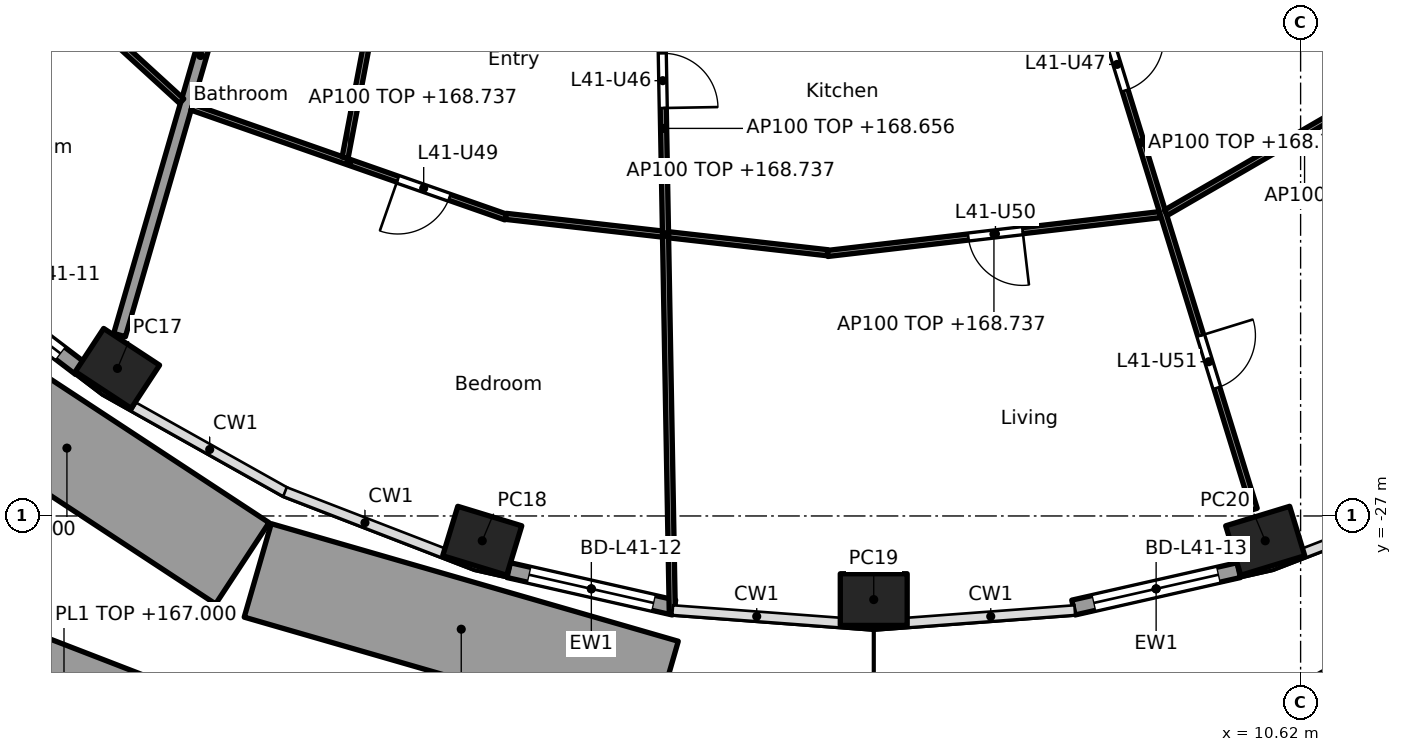
"""IFC4 building model, lengths in metres.
Left out: names, types, materials, properties, quantities, classifications, styles, units other than length and angle.
Written with IfcOpenShell. Run it as: python <this file> out.ifc"""

import sys

from ifc_helpers import new_model, si_unit, direction, frame, frame_2d, origin, origin_2d, place, context, subcontext, project, spatial, rectangle, hollow_rectangle, extrude, element, fill, save


model = new_model("IFC4")
c1 = context("Model", 3, precision=1e-05, world=origin(), true_north=direction((0.0, 1.0)))
c2 = subcontext(c1, "Body", "Model", "MODEL_VIEW")
j1 = project(units=[si_unit("LENGTHUNIT", "METRE"), si_unit("PLANEANGLEUNIT", "RADIAN")], contexts=[c1])
p1 = place(None, origin())
s1 = spatial("IfcSite", under=j1, at=p1, CompositionType="ELEMENT")
p2 = place(p1, origin())
s2 = spatial("IfcBuilding", under=s1, at=p2, CompositionType="ELEMENT")
p3 = place(p2, frame((0.0, 0.0, 165.9)))
s3 = spatial("IfcBuildingStorey", under=s2, at=p3, CompositionType="ELEMENT", Elevation=165.9)
for number, where, z_axis, x_axis in (
    (1, (-8.837, -24.573, -0.26), (0.0, 0.0, 1.0), (0.836, -0.549, 0.0)),
    (2, (-2.838, -27.408, -0.26), (0.0, 0.0, 1.0), (0.957, -0.292, 0.0)),
    (3, (3.6, -28.375, -0.26), (0.0, 0.0, 1.0), (1.0, 0.0, 0.0)),
    (4, (10.038, -27.408, -0.26), (0.0, 0.0, 1.0), (0.957, 0.292, 0.0)),
):
    element("IfcColumn", number, at=place(p3, frame(where, z_axis=z_axis, x_axis=x_axis)), inside=s3, PredefinedType="COLUMN", context=c2, shape_type="SweptSolid", body=[
        extrude(hollow_rectangle(XDim=1.1, YDim=0.85, WallThickness=0.036, at=origin_2d()), origin(), (0.0, 0.0, 1.0), 3.96),
    ])
p4 = place(p3, frame((-9.45, -24.574, 0.0), z_axis=(0.0, 0.0, 1.0), x_axis=(-0.796055733703, 0.60522332146, 0.0)))
e5 = element("IfcWall", 5, at=p4, inside=s3, PredefinedType="SOLIDWALL", context=c2, shape_type="SweptSolid", body=[
    extrude(rectangle(XDim=2.917, YDim=0.25, at=frame_2d((1.458, 0.0))), origin(), (0.0, 0.0, 1.0), 3.44),
])
p5 = place(p4, frame((0.408, 0.0, 0.0)))
e6 = element("IfcOpeningElement", 6, at=p5, cuts=e5, PredefinedType="OPENING", context=c2, shape_type="SweptSolid", body=[
    extrude(rectangle(XDim=2.1, YDim=2.4, at=frame_2d((1.05, 1.2))), frame((0.0, 0.135, 0.0), z_axis=(0.0, -1.0, 0.0), x_axis=(1.0, 0.0, 0.0)), (0.0, 0.0, 1.0), 0.27),
])
p6 = place(p3, frame((0.315, -28.506, 0.0), z_axis=(0.0, 0.0, 1.0), x_axis=(-0.975324329911, 0.220776926974, 0.0)))
e7 = element("IfcWall", 7, at=p6, inside=s3, PredefinedType="SOLIDWALL", context=c2, shape_type="SweptSolid", body=[
    extrude(rectangle(XDim=2.788, YDim=0.25, at=frame_2d((1.394, 0.0))), origin(), (0.0, 0.0, 1.0), 3.44),
])
p7 = place(p6, frame((0.344, 0.0, 0.0)))
e8 = element("IfcOpeningElement", 8, at=p7, cuts=e7, PredefinedType="OPENING", context=c2, shape_type="SweptSolid", body=[
    extrude(rectangle(XDim=2.1, YDim=2.4, at=frame_2d((1.05, 1.2))), frame((0.0, 0.135, 0.0), z_axis=(0.0, -1.0, 0.0), x_axis=(1.0, 0.0, 0.0)), (0.0, 0.0, 1.0), 0.27),
])
p8 = place(p3, frame((9.604, -27.891, 0.0), z_axis=(0.0, 0.0, 1.0), x_axis=(-0.975324329911, -0.220776926974, 0.0)))
e9 = element("IfcWall", 9, at=p8, inside=s3, PredefinedType="SOLIDWALL", context=c2, shape_type="SweptSolid", body=[
    extrude(rectangle(XDim=2.788, YDim=0.25, at=frame_2d((1.394, 0.0))), origin(), (0.0, 0.0, 1.0), 3.44),
])
p9 = place(p8, frame((0.344, 0.0, 0.0)))
e10 = element("IfcOpeningElement", 10, at=p9, cuts=e9, PredefinedType="OPENING", context=c2, shape_type="SweptSolid", body=[
    extrude(rectangle(XDim=2.1, YDim=2.4, at=frame_2d((1.05, 1.2))), frame((0.0, 0.135, 0.0), z_axis=(0.0, -1.0, 0.0), x_axis=(1.0, 0.0, 0.0)), (0.0, 0.0, 1.0), 0.27),
])
p10 = place(p3, frame((-12.553, -23.989, 0.0), z_axis=(0.0, 0.0, 1.0), x_axis=(0.835812595664, -0.549014849462, 0.0)))
e11 = element("IfcWall", 11, at=p10, inside=s3, PredefinedType="SOLIDWALL", context=c2, shape_type="SweptSolid", body=[
    extrude(rectangle(XDim=6.903, YDim=1.6, at=frame_2d((3.451, 0.0))), origin(), (0.0, 0.0, 1.0), 1.1),
])
p11 = place(p3, frame((-6.531, -27.895, 0.0), z_axis=(0.0, 0.0, 1.0), x_axis=(0.96072394004, -0.277505875674, 0.0)))
e12 = element("IfcWall", 12, at=p11, inside=s3, PredefinedType="SOLIDWALL", context=c2, shape_type="SweptSolid", body=[
    extrude(rectangle(XDim=6.968, YDim=1.6, at=frame_2d((3.484, 0.0))), origin(), (0.0, 0.0, 1.0), 1.1),
])
p12 = place(p3, frame((-5.256, -31.693, 0.0), z_axis=(0.0, 0.0, 1.0), x_axis=(-0.932763411203, 0.360489138146, 0.0)))
e13 = element("IfcWall", 13, at=p12, inside=s3, PredefinedType="SOLIDWALL", context=c2, shape_type="SweptSolid", body=[
    extrude(rectangle(XDim=9.563, YDim=1.6, at=frame_2d((4.782, 0.0))), origin(), (0.0, 0.0, 1.0), 1.1),
])
p13 = place(p3, frame((-6.137, -14.83, 0.0), z_axis=(0.0, 0.0, 1.0), x_axis=(-0.278461169897, -0.96044748782, 0.0)))
e14 = element("IfcWall", 14, at=p13, inside=s3, PredefinedType="PARTITIONING", context=c2, shape_type="SweptSolid", body=[
    extrude(rectangle(XDim=9.573, YDim=0.2, at=frame_2d((4.787, 0.0))), origin(), (0.0, 0.0, 1.0), 2.837),
])
p14 = place(p3, frame((-11.766, -16.535, 0.0), z_axis=(0.0, 0.0, 1.0), x_axis=(0.73807320557, -0.674720640872, 0.0)))
e15 = element("IfcWall", 15, at=p14, inside=s3, PredefinedType="PARTITIONING", context=c2, shape_type="SweptSolid", body=[
    extrude(rectangle(XDim=5.399, YDim=0.1, at=frame_2d((2.699, 0.0))), origin(), (0.0, 0.0, 1.0), 2.837),
])
p15 = place(p3, frame((-7.613, -20.278, 0.0), z_axis=(0.0, 0.0, 1.0), x_axis=(0.943918212431, -0.330179357684, 0.0)))
e16 = element("IfcWall", 16, at=p15, inside=s3, PredefinedType="PARTITIONING", context=c2, shape_type="SweptSolid", body=[
    extrude(rectangle(XDim=5.467, YDim=0.1, at=frame_2d((2.734, 0.0))), origin(), (0.0, 0.0, 1.0), 2.837),
])
p16 = place(p15, frame((3.588, 0.0, 0.0)))
e17 = element("IfcOpeningElement", 17, at=p16, cuts=e16, PredefinedType="OPENING", context=c2, shape_type="SweptSolid", body=[
    extrude(rectangle(XDim=0.9, YDim=2.1, at=frame_2d((0.45, 1.05))), frame((0.0, 0.06, 0.0), z_axis=(0.0, -1.0, 0.0), x_axis=(1.0, 0.0, 0.0)), (0.0, 0.0, 1.0), 0.12),
])
p17 = place(p3, frame((-3.488, -12.663, 0.0), z_axis=(0.0, 0.0, 1.0), x_axis=(-0.186783185485, -0.982401161247, 0.0)))
e18 = element("IfcWall", 18, at=p17, inside=s3, PredefinedType="PARTITIONING", context=c2, shape_type="SweptSolid", body=[
    extrude(rectangle(XDim=8.595, YDim=0.1, at=frame_2d((4.298, 0.0))), origin(), (0.0, 0.0, 1.0), 2.756),
])
p18 = place(p17, frame((0.35, 0.0, 0.0)))
e19 = element("IfcOpeningElement", 19, at=p18, cuts=e18, PredefinedType="OPENING", context=c2, shape_type="SweptSolid", body=[
    extrude(rectangle(XDim=0.9, YDim=2.1, at=frame_2d((0.45, 1.05))), frame((0.0, 0.06, 0.0), z_axis=(0.0, -1.0, 0.0), x_axis=(1.0, 0.0, 0.0)), (0.0, 0.0, 1.0), 0.12),
])
p19 = place(p17, frame((5.908, 0.0, 0.0)))
e20 = element("IfcOpeningElement", 20, at=p19, cuts=e18, PredefinedType="OPENING", context=c2, shape_type="SweptSolid", body=[
    extrude(rectangle(XDim=0.9, YDim=2.1, at=frame_2d((0.45, 1.05))), frame((0.0, 0.06, 0.0), z_axis=(0.0, -1.0, 0.0), x_axis=(1.0, 0.0, 0.0)), (0.0, 0.0, 1.0), 0.12),
])
p20 = place(p3, frame((-2.449, -22.073, 0.0), z_axis=(0.0, 0.0, 1.0), x_axis=(0.993660315081, -0.112424099879, 0.0)))
e21 = element("IfcWall", 21, at=p20, inside=s3, PredefinedType="PARTITIONING", context=c2, shape_type="SweptSolid", body=[
    extrude(rectangle(XDim=5.325, YDim=0.1, at=frame_2d((2.662, 0.0))), origin(), (0.0, 0.0, 1.0), 2.837),
])
p21 = place(p3, frame((0.002, -12.665, 0.0), z_axis=(0.0, 0.0, 1.0), x_axis=(0.01792079652, -0.999839409631, 0.0)))
e22 = element("IfcWall", 22, at=p21, inside=s3, PredefinedType="PARTITIONING", context=c2, shape_type="SweptSolid", body=[
    extrude(rectangle(XDim=15.926, YDim=0.1, at=frame_2d((7.963, 0.0))), origin(), (0.0, 0.0, 1.0), 2.756),
])
p22 = place(p21, frame((1.873, 0.0, 0.0)))
e23 = element("IfcOpeningElement", 23, at=p22, cuts=e22, PredefinedType="OPENING", context=c2, shape_type="SweptSolid", body=[
    extrude(rectangle(XDim=0.9, YDim=2.1, at=frame_2d((0.45, 1.05))), frame((0.0, 0.06, 0.0), z_axis=(0.0, -1.0, 0.0), x_axis=(1.0, 0.0, 0.0)), (0.0, 0.0, 1.0), 0.12),
])
p23 = place(p21, frame((6.728, 0.0, 0.0)))
e24 = element("IfcOpeningElement", 24, at=p23, cuts=e22, PredefinedType="OPENING", context=c2, shape_type="SweptSolid", body=[
    extrude(rectangle(XDim=0.9, YDim=2.1, at=frame_2d((0.45, 1.05))), frame((0.0, 0.06, 0.0), z_axis=(0.0, -1.0, 0.0), x_axis=(1.0, 0.0, 0.0)), (0.0, 0.0, 1.0), 0.12),
])
p24 = place(p3, frame((2.842, -22.683, 0.0), z_axis=(0.0, 0.0, 1.0), x_axis=(0.993248590259, 0.116005335864, 0.0)))
e25 = element("IfcWall", 25, at=p24, inside=s3, PredefinedType="PARTITIONING", context=c2, shape_type="SweptSolid", body=[
    extrude(rectangle(XDim=5.508, YDim=0.1, at=frame_2d((2.754, 0.0))), origin(), (0.0, 0.0, 1.0), 2.837),
])
p25 = place(p24, frame((2.329, 0.0, 0.0)))
e26 = element("IfcOpeningElement", 26, at=p25, cuts=e25, PredefinedType="OPENING", context=c2, shape_type="SweptSolid", body=[
    extrude(rectangle(XDim=0.9, YDim=2.1, at=frame_2d((0.45, 1.05))), frame((0.0, 0.06, 0.0), z_axis=(0.0, -1.0, 0.0), x_axis=(1.0, 0.0, 0.0)), (0.0, 0.0, 1.0), 0.12),
])
p26 = place(p3, frame((6.138, -14.83, 0.0), z_axis=(0.0, 0.0, 1.0), x_axis=(0.294818517221, -0.955553264818, 0.0)))
e27 = element("IfcWall", 27, at=p26, inside=s3, PredefinedType="PARTITIONING", context=c2, shape_type="SweptSolid", body=[
    extrude(rectangle(XDim=12.619, YDim=0.1, at=frame_2d((6.31, 0.0))), origin(), (0.0, 0.0, 1.0), 2.837),
])
p27 = place(p26, frame((1.306, 0.0, 0.0)))
e28 = element("IfcOpeningElement", 28, at=p27, cuts=e27, PredefinedType="OPENING", context=c2, shape_type="SweptSolid", body=[
    extrude(rectangle(XDim=0.9, YDim=2.1, at=frame_2d((0.45, 1.05))), frame((0.0, 0.06, 0.0), z_axis=(0.0, -1.0, 0.0), x_axis=(1.0, 0.0, 0.0)), (0.0, 0.0, 1.0), 0.12),
])
p28 = place(p26, frame((4.515, 0.0, 0.0)))
e29 = element("IfcOpeningElement", 29, at=p28, cuts=e27, PredefinedType="OPENING", context=c2, shape_type="SweptSolid", body=[
    extrude(rectangle(XDim=0.9, YDim=2.1, at=frame_2d((0.45, 1.05))), frame((0.0, 0.06, 0.0), z_axis=(0.0, -1.0, 0.0), x_axis=(1.0, 0.0, 0.0)), (0.0, 0.0, 1.0), 0.12),
])
p29 = place(p26, frame((9.632, 0.0, 0.0)))
e30 = element("IfcOpeningElement", 30, at=p29, cuts=e27, PredefinedType="OPENING", context=c2, shape_type="SweptSolid", body=[
    extrude(rectangle(XDim=0.9, YDim=2.1, at=frame_2d((0.45, 1.05))), frame((0.0, 0.06, 0.0), z_axis=(0.0, -1.0, 0.0), x_axis=(1.0, 0.0, 0.0)), (0.0, 0.0, 1.0), 0.12),
])
p30 = place(p3, frame((8.405, -22.013, 0.0), z_axis=(0.0, 0.0, 1.0), x_axis=(0.865277177388, 0.501293732547, 0.0)))
e31 = element("IfcWall", 31, at=p30, inside=s3, PredefinedType="PARTITIONING", context=c2, shape_type="SweptSolid", body=[
    extrude(rectangle(XDim=5.27, YDim=0.1, at=frame_2d((2.635, 0.0))), origin(), (0.0, 0.0, 1.0), 2.837),
])
p31 = place(p3, frame((8.943, -8.966, 0.0), z_axis=(0.0, 0.0, 1.0), x_axis=(0.586803608919, -0.809729290912, 0.0)))
e32 = element("IfcWall", 32, at=p31, inside=s3, PredefinedType="PARTITIONING", context=c2, shape_type="SweptSolid", body=[
    extrude(rectangle(XDim=17.179, YDim=0.1, at=frame_2d((8.589, 0.0))), origin(), (0.0, 0.0, 1.0), 2.756),
])
p32 = place(p31, frame((2.062, 0.0, 0.0)))
e33 = element("IfcOpeningElement", 33, at=p32, cuts=e32, PredefinedType="OPENING", context=c2, shape_type="SweptSolid", body=[
    extrude(rectangle(XDim=0.9, YDim=2.1, at=frame_2d((0.45, 1.05))), frame((0.0, 0.06, 0.0), z_axis=(0.0, -1.0, 0.0), x_axis=(1.0, 0.0, 0.0)), (0.0, 0.0, 1.0), 0.12),
])
p33 = place(p31, frame((7.308, 0.0, 0.0)))
e34 = element("IfcOpeningElement", 34, at=p33, cuts=e32, PredefinedType="OPENING", context=c2, shape_type="SweptSolid", body=[
    extrude(rectangle(XDim=0.9, YDim=2.1, at=frame_2d((0.45, 1.05))), frame((0.0, 0.06, 0.0), z_axis=(0.0, -1.0, 0.0), x_axis=(1.0, 0.0, 0.0)), (0.0, 0.0, 1.0), 0.12),
])
p34 = place(p5, origin())
e35 = element("IfcDoor", 35, at=p34, inside=s3, OperationType="SLIDING_TO_LEFT", PredefinedType="DOOR", context=c2, shape_type="SweptSolid", body=[
    extrude(rectangle(XDim=2.1, YDim=2.4, at=frame_2d((1.05, 1.2))), frame((0.0, 0.025, 0.0), z_axis=(0.0, -1.0, 0.0), x_axis=(1.0, 0.0, 0.0)), (0.0, 0.0, 1.0), 0.05),
])
fill(e6, e35)
p35 = place(p7, origin())
e36 = element("IfcDoor", 36, at=p35, inside=s3, OperationType="SLIDING_TO_LEFT", PredefinedType="DOOR", context=c2, shape_type="SweptSolid", body=[
    extrude(rectangle(XDim=2.1, YDim=2.4, at=frame_2d((1.05, 1.2))), frame((0.0, 0.025, 0.0), z_axis=(0.0, -1.0, 0.0), x_axis=(1.0, 0.0, 0.0)), (0.0, 0.0, 1.0), 0.05),
])
fill(e8, e36)
p36 = place(p9, origin())
e37 = element("IfcDoor", 37, at=p36, inside=s3, OperationType="SLIDING_TO_LEFT", PredefinedType="DOOR", context=c2, shape_type="SweptSolid", body=[
    extrude(rectangle(XDim=2.1, YDim=2.4, at=frame_2d((1.05, 1.2))), frame((0.0, 0.025, 0.0), z_axis=(0.0, -1.0, 0.0), x_axis=(1.0, 0.0, 0.0)), (0.0, 0.0, 1.0), 0.05),
])
fill(e10, e37)
p37 = place(p23, origin())
e38 = element("IfcDoor", 38, at=p37, inside=s3, OperationType="SINGLE_SWING_RIGHT", PredefinedType="DOOR", context=c2, shape_type="SweptSolid", body=[
    extrude(rectangle(XDim=0.9, YDim=2.1, at=frame_2d((0.45, 1.05))), frame((0.0, 0.025, 0.0), z_axis=(0.0, -1.0, 0.0), x_axis=(1.0, 0.0, 0.0)), (0.0, 0.0, 1.0), 0.05),
])
fill(e24, e38)
p38 = place(p28, origin())
e39 = element("IfcDoor", 39, at=p38, inside=s3, OperationType="SINGLE_SWING_LEFT", PredefinedType="DOOR", context=c2, shape_type="SweptSolid", body=[
    extrude(rectangle(XDim=0.9, YDim=2.1, at=frame_2d((0.45, 1.05))), frame((0.0, 0.025, 0.0), z_axis=(0.0, -1.0, 0.0), x_axis=(1.0, 0.0, 0.0)), (0.0, 0.0, 1.0), 0.05),
])
fill(e29, e39)
p39 = place(p16, frame((0.9, 0.0, 0.0), x_axis=(-1.0, 0.0, 0.0)))
e40 = element("IfcDoor", 40, at=p39, inside=s3, OperationType="SINGLE_SWING_RIGHT", PredefinedType="DOOR", context=c2, shape_type="SweptSolid", body=[
    extrude(rectangle(XDim=0.9, YDim=2.1, at=frame_2d((0.45, 1.05))), frame((0.0, 0.025, 0.0), z_axis=(0.0, -1.0, 0.0), x_axis=(1.0, 0.0, 0.0)), (0.0, 0.0, 1.0), 0.05),
])
fill(e17, e40)
p40 = place(p25, frame((0.9, 0.0, 0.0), x_axis=(-1.0, 0.0, 0.0)))
e41 = element("IfcDoor", 41, at=p40, inside=s3, OperationType="SINGLE_SWING_LEFT", PredefinedType="DOOR", context=c2, shape_type="SweptSolid", body=[
    extrude(rectangle(XDim=0.9, YDim=2.1, at=frame_2d((0.45, 1.05))), frame((0.0, 0.025, 0.0), z_axis=(0.0, -1.0, 0.0), x_axis=(1.0, 0.0, 0.0)), (0.0, 0.0, 1.0), 0.05),
])
fill(e26, e41)
p41 = place(p29, origin())
e42 = element("IfcDoor", 42, at=p41, inside=s3, OperationType="SINGLE_SWING_LEFT", PredefinedType="DOOR", context=c2, shape_type="SweptSolid", body=[
    extrude(rectangle(XDim=0.9, YDim=2.1, at=frame_2d((0.45, 1.05))), frame((0.0, 0.025, 0.0), z_axis=(0.0, -1.0, 0.0), x_axis=(1.0, 0.0, 0.0)), (0.0, 0.0, 1.0), 0.05),
])
fill(e30, e42)
save(model, sys.argv[1])
